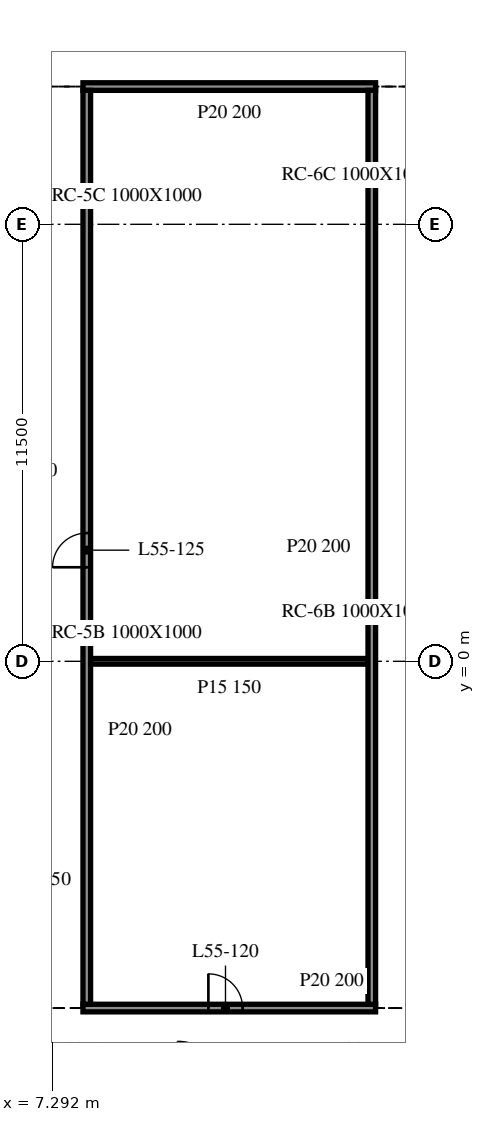
"""IFC4 building model, lengths in metres.
Left out: names, types, materials, properties, quantities, classifications, styles, units other than length and angle.
Written with IfcOpenShell. Run it as: python <this file> out.ifc"""

import sys

from ifc_helpers import new_model, si_unit, direction, frame, frame_2d, origin, place, context, subcontext, project, spatial, rectangle, extrude, element, fill, save


model = new_model("IFC4")
c1 = context("Model", 3, precision=1e-05, world=origin(), true_north=direction((0.0, 1.0)))
c2 = subcontext(c1, "Body", "Model", "MODEL_VIEW")
j1 = project(units=[si_unit("LENGTHUNIT", "METRE"), si_unit("PLANEANGLEUNIT", "RADIAN")], contexts=[c1])
p1 = place(None, origin())
s1 = spatial("IfcSite", under=j1, at=p1, CompositionType="ELEMENT")
p2 = place(p1, origin())
s2 = spatial("IfcBuilding", under=s1, at=p2, CompositionType="ELEMENT")
p3 = place(p2, frame((0.0, 0.0, 228.6)))
s3 = spatial("IfcBuildingStorey", under=s2, at=p3, CompositionType="ELEMENT", Elevation=228.6)
p4 = place(p3, frame((8.1, -9.125, 0.0), z_axis=(0.0, 0.0, 1.0), x_axis=(1.0, 0.0, 0.0)))
e1 = element("IfcWall", 1, at=p4, inside=s3, PredefinedType="PARTITIONING", context=c2, shape_type="SweptSolid", body=[
    extrude(rectangle(XDim=7.7, YDim=0.2, at=frame_2d((3.85, 0.0))), origin(), (0.0, 0.0, 1.0), 3.46),
])
p5 = place(p4, frame((3.3, 0.0, 0.0)))
e2 = element("IfcOpeningElement", 2, at=p5, cuts=e1, PredefinedType="OPENING", context=c2, shape_type="SweptSolid", body=[
    extrude(rectangle(XDim=0.9, YDim=2.1, at=frame_2d((0.45, 1.05))), frame((0.0, 0.11, 0.0), z_axis=(0.0, -1.0, 0.0), x_axis=(1.0, 0.0, 0.0)), (0.0, 0.0, 1.0), 0.22),
])
p6 = place(p3, frame((8.3, 0.0, 0.0), z_axis=(0.0, 0.0, 1.0), x_axis=(1.0, 0.0, 0.0)))
e3 = element("IfcWall", 3, at=p6, inside=s3, PredefinedType="PARTITIONING", context=c2, shape_type="SweptSolid", body=[
    extrude(rectangle(XDim=7.3, YDim=0.15, at=frame_2d((3.65, 0.0))), origin(), (0.0, 0.0, 1.0), 3.46),
])
p7 = place(p3, frame((8.1, 15.125, 0.0), z_axis=(0.0, 0.0, 1.0), x_axis=(1.0, 0.0, 0.0)))
e4 = element("IfcWall", 4, at=p7, inside=s3, PredefinedType="PARTITIONING", context=c2, shape_type="SweptSolid", body=[
    extrude(rectangle(XDim=7.7, YDim=0.2, at=frame_2d((3.85, 0.0))), origin(), (0.0, 0.0, 1.0), 3.46),
])
p8 = place(p3, frame((8.2, -9.025, 0.0), z_axis=(0.0, 0.0, 1.0), x_axis=(0.0, 1.0, 0.0)))
e5 = element("IfcWall", 5, at=p8, inside=s3, PredefinedType="PARTITIONING", context=c2, shape_type="SweptSolid", body=[
    extrude(rectangle(XDim=24.05, YDim=0.2, at=frame_2d((12.025, 0.0))), origin(), (0.0, 0.0, 1.0), 3.46),
])
p9 = place(p8, frame((11.5, 0.0, 0.0)))
e6 = element("IfcOpeningElement", 6, at=p9, cuts=e5, PredefinedType="OPENING", context=c2, shape_type="SweptSolid", body=[
    extrude(rectangle(XDim=0.9, YDim=2.1, at=frame_2d((0.45, 1.05))), frame((0.0, 0.11, 0.0), z_axis=(0.0, -1.0, 0.0), x_axis=(1.0, 0.0, 0.0)), (0.0, 0.0, 1.0), 0.22),
])
p10 = place(p3, frame((15.7, -9.025, 0.0), z_axis=(0.0, 0.0, 1.0), x_axis=(0.0, 1.0, 0.0)))
e7 = element("IfcWall", 7, at=p10, inside=s3, PredefinedType="PARTITIONING", context=c2, shape_type="SweptSolid", body=[
    extrude(rectangle(XDim=24.05, YDim=0.2, at=frame_2d((12.025, 0.0))), origin(), (0.0, 0.0, 1.0), 3.46),
])
p11 = place(p5, origin())
e8 = element("IfcDoor", 8, at=p11, inside=s3, OperationType="SINGLE_SWING_LEFT", PredefinedType="DOOR", context=c2, shape_type="SweptSolid", body=[
    extrude(rectangle(XDim=0.9, YDim=2.1, at=frame_2d((0.45, 1.05))), frame((0.0, 0.025, 0.0), z_axis=(0.0, -1.0, 0.0), x_axis=(1.0, 0.0, 0.0)), (0.0, 0.0, 1.0), 0.05),
])
fill(e2, e8)
p12 = place(p9, origin())
e9 = element("IfcDoor", 9, at=p12, inside=s3, OperationType="SINGLE_SWING_RIGHT", PredefinedType="DOOR", context=c2, shape_type="SweptSolid", body=[
    extrude(rectangle(XDim=0.9, YDim=2.1, at=frame_2d((0.45, 1.05))), frame((0.0, 0.025, 0.0), z_axis=(0.0, -1.0, 0.0), x_axis=(1.0, 0.0, 0.0)), (0.0, 0.0, 1.0), 0.05),
])
fill(e6, e9)
save(model, sys.argv[1])
